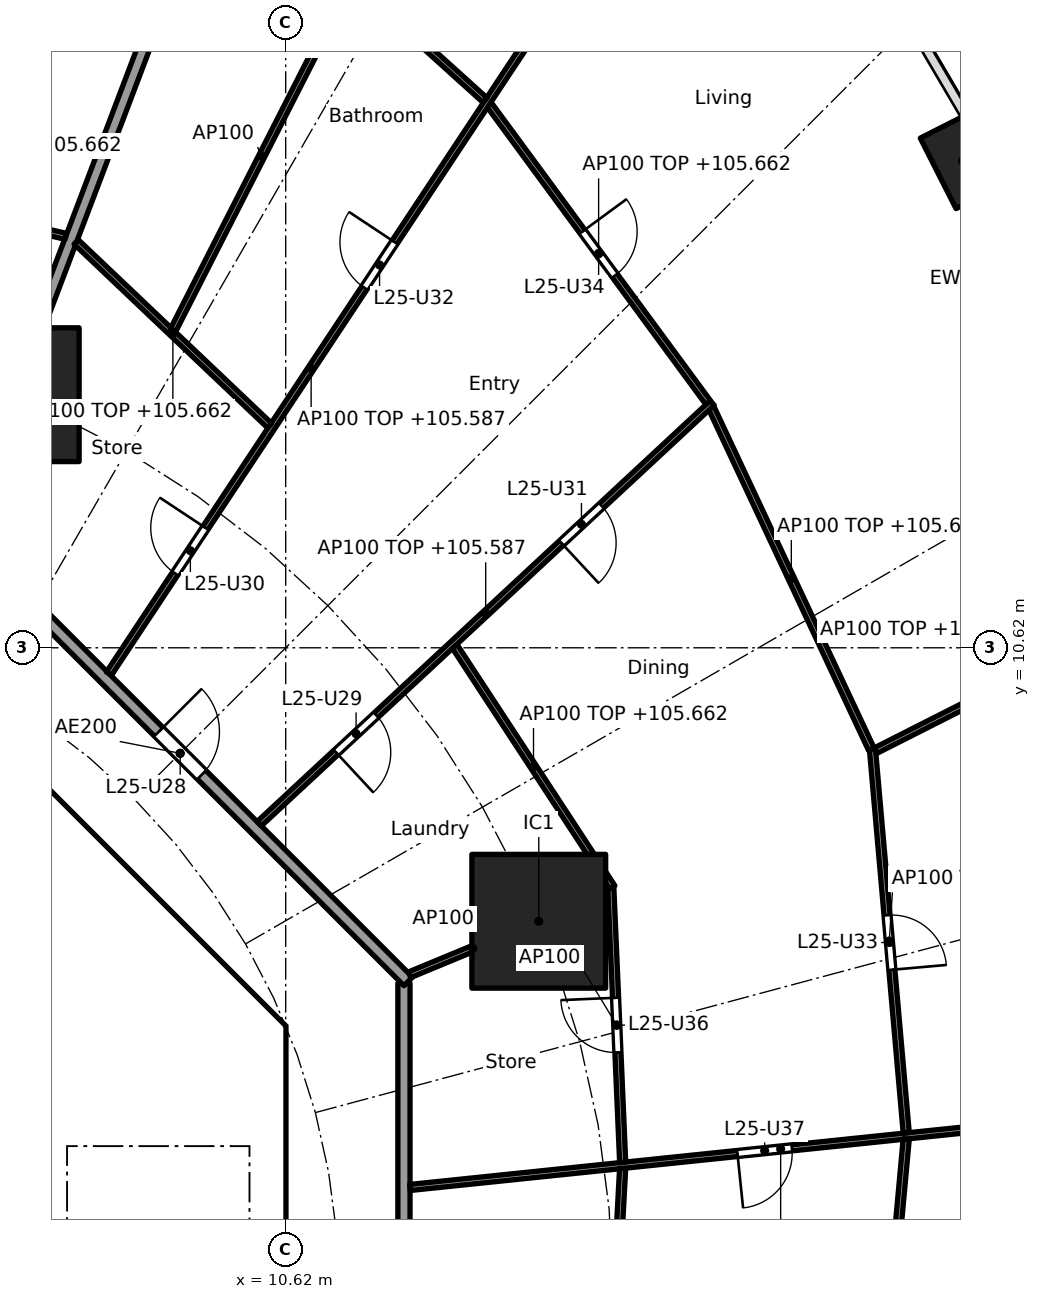
"""IFC4 building model, lengths in metres.
Left out: names, types, materials, properties, quantities, classifications, styles, units other than length and angle.
Written with IfcOpenShell. Run it as: python <this file> out.ifc"""

import sys

from ifc_helpers import new_model, si_unit, direction, frame, frame_2d, origin, origin_2d, place, context, subcontext, project, spatial, polyline, rectangle, hollow_rectangle, outline, extrude, element, fill, save


model = new_model("IFC4")
c1 = context("Model", 3, precision=1e-05, world=origin(), true_north=direction((0.0, 1.0)))
c2 = subcontext(c1, "Body", "Model", "MODEL_VIEW")
j1 = project(units=[si_unit("LENGTHUNIT", "METRE"), si_unit("PLANEANGLEUNIT", "RADIAN")], contexts=[c1])
p1 = place(None, origin())
s1 = spatial("IfcSite", under=j1, at=p1, CompositionType="ELEMENT")
p2 = place(p1, origin())
s2 = spatial("IfcBuilding", under=s1, at=p2, CompositionType="ELEMENT")
p3 = place(p2, frame((0.0, 0.0, 102.9)))
s3 = spatial("IfcBuildingStorey", under=s2, at=p3, CompositionType="ELEMENT", Elevation=102.9)
p4 = place(p3, frame((21.751, 18.625, 0.0), z_axis=(0.0, 0.0, 1.0), x_axis=(-0.452462697578, 0.891783329795, 0.0)))
e1 = element("IfcColumn", 1, at=p4, inside=s3, PredefinedType="COLUMN", context=c2, shape_type="SweptSolid", body=[
    extrude(hollow_rectangle(XDim=1.3, YDim=0.9, WallThickness=0.045, at=origin_2d()), origin(), (0.0, 0.0, 1.0), 3.7),
])
for number, where, z_axis, x_axis in (
    (2, (14.782, 6.123, 0.0), (0.0, 0.0, 1.0), (1.0, 0.0, 0.0)),
    (3, (6.123, 14.782, 0.0), (0.0, 0.0, 1.0), (1.0, 0.0, 0.0)),
):
    element("IfcColumn", number, at=place(p3, frame(where, z_axis=z_axis, x_axis=x_axis)), inside=s3, PredefinedType="COLUMN", context=c2, shape_type="SweptSolid", body=[
        extrude(rectangle(XDim=2.2, YDim=2.2, at=origin_2d()), origin(), (0.0, 0.0, 1.0), 3.7),
    ])
p5 = place(p3, frame((9.988, 4.613, 0.0), z_axis=(0.0, 0.0, 1.0), x_axis=(-0.707106781187, 0.707106781187, 0.0)))
e4 = element("IfcWall", 4, at=p5, inside=s3, PredefinedType="SHEAR", context=c2, shape_type="SweptSolid", body=[
    extrude(rectangle(XDim=7.602, YDim=0.6, at=frame_2d((3.801, 0.0))), origin(), (0.0, 0.0, 1.0), 3.44),
])
p6 = place(p5, frame((3.201, 0.0, 0.0)))
e5 = element("IfcOpeningElement", 5, at=p6, cuts=e4, PredefinedType="OPENING", context=c2, shape_type="SweptSolid", body=[
    extrude(rectangle(XDim=1.2, YDim=2.1, at=frame_2d((0.6, 1.05))), frame((0.0, 0.31, 0.0), z_axis=(0.0, -1.0, 0.0), x_axis=(1.0, 0.0, 0.0)), (0.0, 0.0, 1.0), 0.62),
])
p7 = place(p3, frame((6.7, 4.0, 0.0), z_axis=(0.0, 0.0, 1.0), x_axis=(1.0, 0.0, 0.0)))
e6 = element("IfcWall", 6, at=p7, inside=s3, PredefinedType="SOLIDWALL", context=c2, shape_type="SweptSolid", body=[
    extrude(rectangle(XDim=3.325, YDim=0.2, at=frame_2d((1.662, 0.0))), origin(), (0.0, 0.0, 1.0), 3.44),
])
p8 = place(p7, frame((1.25, 0.0, 0.0)))
e7 = element("IfcOpeningElement", 7, at=p8, cuts=e6, PredefinedType="OPENING", context=c2, shape_type="SweptSolid", body=[
    extrude(rectangle(XDim=1.1, YDim=2.1, at=frame_2d((0.55, 1.05))), frame((0.0, 0.11, 0.0), z_axis=(0.0, -1.0, 0.0), x_axis=(1.0, 0.0, 0.0)), (0.0, 0.0, 1.0), 0.22),
])
p9 = place(p3, origin())
e8 = element("IfcWall", 8, at=p9, inside=s3, PredefinedType="SHEAR", context=c2, shape_type="SweptSolid", body=[
    extrude(outline(polyline([(9.776, -4.401), (10.025, -4.152), (10.025, -3.801), (10.025, 4.152), (9.776, 4.401), (10.2, 4.825), (10.625, 4.401), (10.625, -4.401), (10.2, -4.825), (9.776, -4.401)])), origin(), (0.0, 0.0, 1.0), 3.44),
])
p10 = place(p3, origin())
e9 = element("IfcWall", 9, at=p10, inside=s3, PredefinedType="SOLIDWALL", context=c2, shape_type="SweptSolid", body=[
    extrude(outline(polyline([(7.025, -3.9), (6.7, -3.9), (6.7, 3.9), (7.025, 3.9), (7.025, -3.9)])), origin(), (0.0, 0.0, 1.0), 3.44),
])
p11 = place(p3, frame((6.141, 14.829, 0.0), z_axis=(0.0, 0.0, 1.0), x_axis=(0.354477134193, 0.935064682968, 0.0)))
e10 = element("IfcWall", 10, at=p11, inside=s3, PredefinedType="PARTITIONING", context=c2, shape_type="SweptSolid", body=[
    extrude(rectangle(XDim=15.626, YDim=0.2, at=frame_2d((7.813, 0.0))), origin(), (0.0, 0.0, 1.0), 2.762),
])
p12 = place(p3, frame((12.565, -5.104, 0.0), z_axis=(0.0, 0.0, 1.0), x_axis=(0.0, 1.0, 0.0)))
e11 = element("IfcWall", 11, at=p12, inside=s3, PredefinedType="PARTITIONING", context=c2, shape_type="SweptSolid", body=[
    extrude(rectangle(XDim=10.209, YDim=0.2, at=frame_2d((5.104, 0.0))), origin(), (0.0, 0.0, 1.0), 3.44),
])
p13 = place(p3, frame((12.635, 5.134, 0.0), z_axis=(0.0, 0.0, 1.0), x_axis=(-0.707106781187, 0.707106781187, 0.0)))
e12 = element("IfcWall", 12, at=p13, inside=s3, PredefinedType="PARTITIONING", context=c2, shape_type="SweptSolid", body=[
    extrude(rectangle(XDim=10.609, YDim=0.2, at=frame_2d((5.305, 0.0))), origin(), (0.0, 0.0, 1.0), 3.44),
])
p14 = place(p13, frame((4.804, 0.0, 0.0)))
e13 = element("IfcOpeningElement", 13, at=p14, cuts=e12, PredefinedType="OPENING", context=c2, shape_type="SweptSolid", body=[
    extrude(rectangle(XDim=1.0, YDim=2.1, at=frame_2d((0.5, 1.05))), frame((0.0, 0.11, 0.0), z_axis=(0.0, -1.0, 0.0), x_axis=(1.0, 0.0, 0.0)), (0.0, 0.0, 1.0), 0.22),
])
p15 = place(p3, frame((12.664, 1.745, 0.0), z_axis=(0.0, 0.0, 1.0), x_axis=(0.994662790212, 0.103179134358, 0.0)))
e14 = element("IfcWall", 14, at=p15, inside=s3, PredefinedType="PARTITIONING", context=c2, shape_type="SweptSolid", body=[
    extrude(rectangle(XDim=12.257, YDim=0.1, at=frame_2d((6.128, 0.0))), origin(), (0.0, 0.0, 1.0), 2.687),
])
p16 = place(p15, frame((5.414, 0.0, 0.0)))
e15 = element("IfcOpeningElement", 15, at=p16, cuts=e14, PredefinedType="OPENING", context=c2, shape_type="SweptSolid", body=[
    extrude(rectangle(XDim=0.9, YDim=2.1, at=frame_2d((0.45, 1.05))), frame((0.0, 0.06, 0.0), z_axis=(0.0, -1.0, 0.0), x_axis=(1.0, 0.0, 0.0)), (0.0, 0.0, 1.0), 0.12),
])
p17 = place(p3, frame((16.162, 2.158, 0.0), z_axis=(0.0, 0.0, 1.0), x_axis=(-0.043120653248, 0.999069872063, 0.0)))
e16 = element("IfcWall", 16, at=p17, inside=s3, PredefinedType="PARTITIONING", context=c2, shape_type="SweptSolid", body=[
    extrude(rectangle(XDim=4.518, YDim=0.1, at=frame_2d((2.259, 0.0))), origin(), (0.0, 0.0, 1.0), 3.44),
])
p18 = place(p17, frame((1.809, 0.0, 0.0)))
e17 = element("IfcOpeningElement", 17, at=p18, cuts=e16, PredefinedType="OPENING", context=c2, shape_type="SweptSolid", body=[
    extrude(rectangle(XDim=0.9, YDim=2.1, at=frame_2d((0.45, 1.05))), frame((0.0, 0.06, 0.0), z_axis=(0.0, -1.0, 0.0), x_axis=(1.0, 0.0, 0.0)), (0.0, 0.0, 1.0), 0.12),
])
p19 = place(p3, frame((16.161, 2.058, 0.0), z_axis=(0.0, 0.0, 1.0), x_axis=(-0.053696394729, -0.998557307916, 0.0)))
e18 = element("IfcWall", 18, at=p19, inside=s3, PredefinedType="PARTITIONING", context=c2, shape_type="SweptSolid", body=[
    extrude(rectangle(XDim=4.742, YDim=0.1, at=frame_2d((2.371, 0.0))), origin(), (0.0, 0.0, 1.0), 2.762),
])
p20 = place(p19, frame((1.896, 0.0, 0.0)))
e19 = element("IfcOpeningElement", 19, at=p20, cuts=e18, PredefinedType="OPENING", context=c2, shape_type="SweptSolid", body=[
    extrude(rectangle(XDim=0.9, YDim=2.1, at=frame_2d((0.45, 1.05))), frame((0.0, 0.06, 0.0), z_axis=(0.0, -1.0, 0.0), x_axis=(1.0, 0.0, 0.0)), (0.0, 0.0, 1.0), 0.12),
])
p21 = place(p3, frame((20.825, 2.642, 0.0), z_axis=(0.0, 0.0, 1.0), x_axis=(-0.08776338161, 0.996141349834, 0.0)))
e20 = element("IfcWall", 20, at=p21, inside=s3, PredefinedType="PARTITIONING", context=c2, shape_type="SweptSolid", body=[
    extrude(rectangle(XDim=6.337, YDim=0.1, at=frame_2d((3.168, 0.0))), origin(), (0.0, 0.0, 1.0), 2.762),
])
p22 = place(p21, frame((2.694, 0.0, 0.0)))
e21 = element("IfcOpeningElement", 21, at=p22, cuts=e20, PredefinedType="OPENING", context=c2, shape_type="SweptSolid", body=[
    extrude(rectangle(XDim=0.9, YDim=2.1, at=frame_2d((0.45, 1.05))), frame((0.0, 0.06, 0.0), z_axis=(0.0, -1.0, 0.0), x_axis=(1.0, 0.0, 0.0)), (0.0, 0.0, 1.0), 0.12),
])
p23 = place(p3, frame((20.825, 2.542, 0.0), z_axis=(0.0, 0.0, 1.0), x_axis=(-0.09140211812, -0.995814065377, 0.0)))
e22 = element("IfcWall", 22, at=p23, inside=s3, PredefinedType="PARTITIONING", context=c2, shape_type="SweptSolid", body=[
    extrude(rectangle(XDim=6.403, YDim=0.1, at=frame_2d((3.201, 0.0))), origin(), (0.0, 0.0, 1.0), 2.762),
])
p24 = place(p23, frame((2.726, 0.0, 0.0)))
e23 = element("IfcOpeningElement", 23, at=p24, cuts=e22, PredefinedType="OPENING", context=c2, shape_type="SweptSolid", body=[
    extrude(rectangle(XDim=0.9, YDim=2.1, at=frame_2d((0.45, 1.05))), frame((0.0, 0.06, 0.0), z_axis=(0.0, -1.0, 0.0), x_axis=(1.0, 0.0, 0.0)), (0.0, 0.0, 1.0), 0.12),
])
p25 = place(p3, frame((12.657, 5.243, 0.0), z_axis=(0.0, 0.0, 1.0), x_axis=(0.923864733477, 0.382719158442, 0.0)))
e24 = element("IfcWall", 24, at=p25, inside=s3, PredefinedType="PARTITIONING", context=c2, shape_type="SweptSolid", body=[
    extrude(rectangle(XDim=2.25, YDim=0.1, at=frame_2d((1.125, 0.0))), origin(), (0.0, 0.0, 1.0), 3.44),
])
p26 = place(p3, frame((15.992, 6.68, 0.0), z_axis=(0.0, 0.0, 1.0), x_axis=(-0.547472878942, 0.836823426311, 0.0)))
e25 = element("IfcWall", 25, at=p26, inside=s3, PredefinedType="PARTITIONING", context=c2, shape_type="SweptSolid", body=[
    extrude(rectangle(XDim=4.738, YDim=0.1, at=frame_2d((2.369, 0.0))), origin(), (0.0, 0.0, 1.0), 2.762),
])
p27 = place(p3, frame((20.318, 8.927, 0.0), z_axis=(0.0, 0.0, 1.0), x_axis=(0.892057836959, 0.451921249246, 0.0)))
e26 = element("IfcWall", 26, at=p27, inside=s3, PredefinedType="PARTITIONING", context=c2, shape_type="SweptSolid", body=[
    extrude(rectangle(XDim=4.164, YDim=0.1, at=frame_2d((2.082, 0.0))), origin(), (0.0, 0.0, 1.0), 2.762),
])
p28 = place(p3, frame((20.252, 8.95, 0.0), z_axis=(0.0, 0.0, 1.0), x_axis=(-0.424580052627, 0.90539040138, 0.0)))
e27 = element("IfcWall", 27, at=p28, inside=s3, PredefinedType="PARTITIONING", context=c2, shape_type="SweptSolid", body=[
    extrude(rectangle(XDim=6.204, YDim=0.1, at=frame_2d((3.102, 0.0))), origin(), (0.0, 0.0, 1.0), 2.762),
])
p29 = place(p3, frame((10.185, 7.726, 0.0), z_axis=(0.0, 0.0, 1.0), x_axis=(0.732598472978, 0.680661059112, 0.0)))
e28 = element("IfcWall", 28, at=p29, inside=s3, PredefinedType="PARTITIONING", context=c2, shape_type="SweptSolid", body=[
    extrude(rectangle(XDim=10.167, YDim=0.1, at=frame_2d((5.084, 0.0))), origin(), (0.0, 0.0, 1.0), 2.687),
])
p30 = place(p29, frame((1.725, 0.0, 0.0)))
e29 = element("IfcOpeningElement", 29, at=p30, cuts=e28, PredefinedType="OPENING", context=c2, shape_type="SweptSolid", body=[
    extrude(rectangle(XDim=0.9, YDim=2.1, at=frame_2d((0.45, 1.05))), frame((0.0, 0.06, 0.0), z_axis=(0.0, -1.0, 0.0), x_axis=(1.0, 0.0, 0.0)), (0.0, 0.0, 1.0), 0.12),
])
p31 = place(p29, frame((6.784, 0.0, 0.0)))
e30 = element("IfcOpeningElement", 30, at=p31, cuts=e28, PredefinedType="OPENING", context=c2, shape_type="SweptSolid", body=[
    extrude(rectangle(XDim=0.9, YDim=2.1, at=frame_2d((0.45, 1.05))), frame((0.0, 0.06, 0.0), z_axis=(0.0, -1.0, 0.0), x_axis=(1.0, 0.0, 0.0)), (0.0, 0.0, 1.0), 0.12),
])
p32 = place(p3, frame((17.567, 14.653, 0.0), z_axis=(0.0, 0.0, 1.0), x_axis=(-0.592391983588, 0.80564988536, 0.0)))
e31 = element("IfcWall", 31, at=p32, inside=s3, PredefinedType="PARTITIONING", context=c2, shape_type="SweptSolid", body=[
    extrude(rectangle(XDim=6.08, YDim=0.1, at=frame_2d((3.04, 0.0))), origin(), (0.0, 0.0, 1.0), 2.762),
])
p33 = place(p32, frame((2.59, 0.0, 0.0)))
e32 = element("IfcOpeningElement", 32, at=p33, cuts=e31, PredefinedType="OPENING", context=c2, shape_type="SweptSolid", body=[
    extrude(rectangle(XDim=0.9, YDim=2.1, at=frame_2d((0.45, 1.05))), frame((0.0, 0.06, 0.0), z_axis=(0.0, -1.0, 0.0), x_axis=(1.0, 0.0, 0.0)), (0.0, 0.0, 1.0), 0.12),
])
p34 = place(p3, frame((7.713, 10.195, 0.0), z_axis=(0.0, 0.0, 1.0), x_axis=(0.552111071171, 0.833770571015, 0.0)))
e33 = element("IfcWall", 33, at=p34, inside=s3, PredefinedType="PARTITIONING", context=c2, shape_type="SweptSolid", body=[
    extrude(rectangle(XDim=17.208, YDim=0.1, at=frame_2d((8.604, 0.0))), origin(), (0.0, 0.0, 1.0), 2.687),
])
p35 = place(p34, frame((1.976, 0.0, 0.0)))
e34 = element("IfcOpeningElement", 34, at=p35, cuts=e33, PredefinedType="OPENING", context=c2, shape_type="SweptSolid", body=[
    extrude(rectangle(XDim=0.9, YDim=2.1, at=frame_2d((0.45, 1.05))), frame((0.0, 0.06, 0.0), z_axis=(0.0, -1.0, 0.0), x_axis=(1.0, 0.0, 0.0)), (0.0, 0.0, 1.0), 0.12),
])
p36 = place(p34, frame((7.611, 0.0, 0.0)))
e35 = element("IfcOpeningElement", 35, at=p36, cuts=e33, PredefinedType="OPENING", context=c2, shape_type="SweptSolid", body=[
    extrude(rectangle(XDim=0.9, YDim=2.1, at=frame_2d((0.45, 1.05))), frame((0.0, 0.06, 0.0), z_axis=(0.0, -1.0, 0.0), x_axis=(1.0, 0.0, 0.0)), (0.0, 0.0, 1.0), 0.12),
])
p37 = place(p34, frame((13.79, 0.0, 0.0)))
e36 = element("IfcOpeningElement", 36, at=p37, cuts=e33, PredefinedType="OPENING", context=c2, shape_type="SweptSolid", body=[
    extrude(rectangle(XDim=0.9, YDim=2.1, at=frame_2d((0.45, 1.05))), frame((0.0, 0.06, 0.0), z_axis=(0.0, -1.0, 0.0), x_axis=(1.0, 0.0, 0.0)), (0.0, 0.0, 1.0), 0.12),
])
p38 = place(p3, frame((10.355, 14.274, 0.0), z_axis=(0.0, 0.0, 1.0), x_axis=(-0.725206433622, 0.688531501555, 0.0)))
e37 = element("IfcWall", 37, at=p38, inside=s3, PredefinedType="PARTITIONING", context=c2, shape_type="SweptSolid", body=[
    extrude(rectangle(XDim=4.387, YDim=0.1, at=frame_2d((2.193, 0.0))), origin(), (0.0, 0.0, 1.0), 2.762),
])
p39 = place(p3, frame((13.898, 19.625, 0.0), z_axis=(0.0, 0.0, 1.0), x_axis=(-0.742396654702, 0.669960601146, 0.0)))
e38 = element("IfcWall", 38, at=p39, inside=s3, PredefinedType="PARTITIONING", context=c2, shape_type="SweptSolid", body=[
    extrude(rectangle(XDim=5.861, YDim=0.1, at=frame_2d((2.931, 0.0))), origin(), (0.0, 0.0, 1.0), 2.762),
])
p40 = place(p39, frame((3.958, 0.0, 0.0)))
e39 = element("IfcOpeningElement", 39, at=p40, cuts=e38, PredefinedType="OPENING", context=c2, shape_type="SweptSolid", body=[
    extrude(rectangle(XDim=0.9, YDim=2.1, at=frame_2d((0.45, 1.05))), frame((0.0, 0.06, 0.0), z_axis=(0.0, -1.0, 0.0), x_axis=(1.0, 0.0, 0.0)), (0.0, 0.0, 1.0), 0.12),
])
p41 = place(p3, frame((8.769, 15.846, 0.0), z_axis=(0.0, 0.0, 1.0), x_axis=(0.454067187552, 0.890967445639, 0.0)))
e40 = element("IfcWall", 40, at=p41, inside=s3, PredefinedType="PARTITIONING", context=c2, shape_type="SweptSolid", body=[
    extrude(rectangle(XDim=6.414, YDim=0.1, at=frame_2d((3.207, 0.0))), origin(), (0.0, 0.0, 1.0), 3.44),
])
p42 = place(p3, frame((7.004, 17.386, 0.0), z_axis=(0.0, 0.0, 1.0), x_axis=(-0.974179728512, 0.225773905837, 0.0)))
e41 = element("IfcWall", 41, at=p42, inside=s3, PredefinedType="PARTITIONING", context=c2, shape_type="SweptSolid", body=[
    extrude(rectangle(XDim=3.802, YDim=0.1, at=frame_2d((1.901, 0.0))), origin(), (0.0, 0.0, 1.0), 2.762),
])
p43 = place(p8, frame((1.1, 0.0, 0.0), x_axis=(-1.0, 0.0, 0.0)))
e42 = element("IfcDoor", 42, at=p43, inside=s3, OperationType="SINGLE_SWING_RIGHT", PredefinedType="DOOR", context=c2, shape_type="SweptSolid", body=[
    extrude(rectangle(XDim=1.1, YDim=2.1, at=frame_2d((0.55, 1.05))), frame((0.0, 0.025, 0.0), z_axis=(0.0, -1.0, 0.0), x_axis=(1.0, 0.0, 0.0)), (0.0, 0.0, 1.0), 0.05),
])
fill(e7, e42)
p44 = place(p6, origin())
e43 = element("IfcDoor", 43, at=p44, inside=s3, OperationType="SINGLE_SWING_LEFT", PredefinedType="DOOR", context=c2, shape_type="SweptSolid", body=[
    extrude(rectangle(XDim=1.2, YDim=2.1, at=frame_2d((0.6, 1.05))), frame((0.0, 0.025, 0.0), z_axis=(0.0, -1.0, 0.0), x_axis=(1.0, 0.0, 0.0)), (0.0, 0.0, 1.0), 0.05),
])
fill(e5, e43)
p45 = place(p14, frame((1.0, 0.0, 0.0), x_axis=(-1.0, 0.0, 0.0)))
e44 = element("IfcDoor", 44, at=p45, inside=s3, OperationType="SINGLE_SWING_LEFT", PredefinedType="DOOR", context=c2, shape_type="SweptSolid", body=[
    extrude(rectangle(XDim=1.0, YDim=2.1, at=frame_2d((0.5, 1.05))), frame((0.0, 0.025, 0.0), z_axis=(0.0, -1.0, 0.0), x_axis=(1.0, 0.0, 0.0)), (0.0, 0.0, 1.0), 0.05),
])
fill(e13, e44)
p46 = place(p30, frame((0.9, 0.0, 0.0), x_axis=(-1.0, 0.0, 0.0)))
e45 = element("IfcDoor", 45, at=p46, inside=s3, OperationType="SINGLE_SWING_RIGHT", PredefinedType="DOOR", context=c2, shape_type="SweptSolid", body=[
    extrude(rectangle(XDim=0.9, YDim=2.1, at=frame_2d((0.45, 1.05))), frame((0.0, 0.025, 0.0), z_axis=(0.0, -1.0, 0.0), x_axis=(1.0, 0.0, 0.0)), (0.0, 0.0, 1.0), 0.05),
])
fill(e29, e45)
p47 = place(p35, origin())
e46 = element("IfcDoor", 46, at=p47, inside=s3, OperationType="SINGLE_SWING_RIGHT", PredefinedType="DOOR", context=c2, shape_type="SweptSolid", body=[
    extrude(rectangle(XDim=0.9, YDim=2.1, at=frame_2d((0.45, 1.05))), frame((0.0, 0.025, 0.0), z_axis=(0.0, -1.0, 0.0), x_axis=(1.0, 0.0, 0.0)), (0.0, 0.0, 1.0), 0.05),
])
fill(e34, e46)
p48 = place(p31, frame((0.9, 0.0, 0.0), x_axis=(-1.0, 0.0, 0.0)))
e47 = element("IfcDoor", 47, at=p48, inside=s3, OperationType="SINGLE_SWING_RIGHT", PredefinedType="DOOR", context=c2, shape_type="SweptSolid", body=[
    extrude(rectangle(XDim=0.9, YDim=2.1, at=frame_2d((0.45, 1.05))), frame((0.0, 0.025, 0.0), z_axis=(0.0, -1.0, 0.0), x_axis=(1.0, 0.0, 0.0)), (0.0, 0.0, 1.0), 0.05),
])
fill(e30, e47)
p49 = place(p36, origin())
e48 = element("IfcDoor", 48, at=p49, inside=s3, OperationType="SINGLE_SWING_RIGHT", PredefinedType="DOOR", context=c2, shape_type="SweptSolid", body=[
    extrude(rectangle(XDim=0.9, YDim=2.1, at=frame_2d((0.45, 1.05))), frame((0.0, 0.025, 0.0), z_axis=(0.0, -1.0, 0.0), x_axis=(1.0, 0.0, 0.0)), (0.0, 0.0, 1.0), 0.05),
])
fill(e35, e48)
p50 = place(p22, frame((0.9, 0.0, 0.0), x_axis=(-1.0, 0.0, 0.0)))
e49 = element("IfcDoor", 49, at=p50, inside=s3, OperationType="SINGLE_SWING_RIGHT", PredefinedType="DOOR", context=c2, shape_type="SweptSolid", body=[
    extrude(rectangle(XDim=0.9, YDim=2.1, at=frame_2d((0.45, 1.05))), frame((0.0, 0.025, 0.0), z_axis=(0.0, -1.0, 0.0), x_axis=(1.0, 0.0, 0.0)), (0.0, 0.0, 1.0), 0.05),
])
fill(e21, e49)
p51 = place(p33, frame((0.9, 0.0, 0.0), x_axis=(-1.0, 0.0, 0.0)))
e50 = element("IfcDoor", 50, at=p51, inside=s3, OperationType="SINGLE_SWING_LEFT", PredefinedType="DOOR", context=c2, shape_type="SweptSolid", body=[
    extrude(rectangle(XDim=0.9, YDim=2.1, at=frame_2d((0.45, 1.05))), frame((0.0, 0.025, 0.0), z_axis=(0.0, -1.0, 0.0), x_axis=(1.0, 0.0, 0.0)), (0.0, 0.0, 1.0), 0.05),
])
fill(e32, e50)
p52 = place(p18, origin())
e51 = element("IfcDoor", 51, at=p52, inside=s3, OperationType="SINGLE_SWING_RIGHT", PredefinedType="DOOR", context=c2, shape_type="SweptSolid", body=[
    extrude(rectangle(XDim=0.9, YDim=2.1, at=frame_2d((0.45, 1.05))), frame((0.0, 0.025, 0.0), z_axis=(0.0, -1.0, 0.0), x_axis=(1.0, 0.0, 0.0)), (0.0, 0.0, 1.0), 0.05),
])
fill(e17, e51)
p53 = place(p16, frame((0.9, 0.0, 0.0), x_axis=(-1.0, 0.0, 0.0)))
e52 = element("IfcDoor", 52, at=p53, inside=s3, OperationType="SINGLE_SWING_RIGHT", PredefinedType="DOOR", context=c2, shape_type="SweptSolid", body=[
    extrude(rectangle(XDim=0.9, YDim=2.1, at=frame_2d((0.45, 1.05))), frame((0.0, 0.025, 0.0), z_axis=(0.0, -1.0, 0.0), x_axis=(1.0, 0.0, 0.0)), (0.0, 0.0, 1.0), 0.05),
])
fill(e15, e52)
save(model, sys.argv[1])
